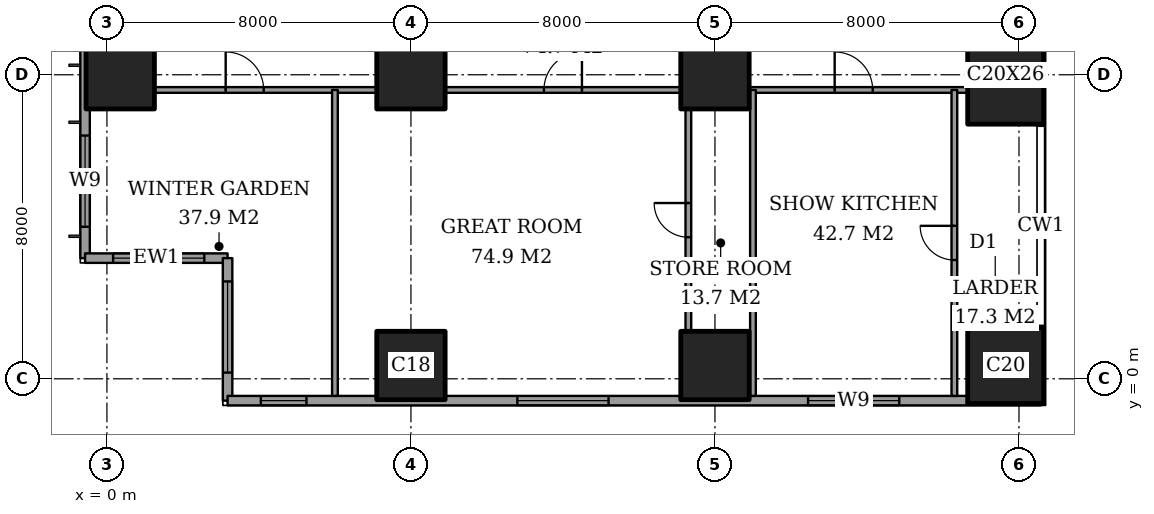
"""IFC4 building model, lengths in metres.
Left out: names, types, materials, properties, quantities, classifications, styles, units other than length and angle.
Written with IfcOpenShell. Run it as: python <this file> out.ifc"""

import sys

from ifc_helpers import new_model, si_unit, direction, frame, frame_2d, origin, origin_2d, place, context, subcontext, project, spatial, rectangle, extrude, element, fill, save


model = new_model("IFC4")
c1 = context("Model", 3, precision=1e-05, world=origin(), true_north=direction((0.0, 1.0)))
c2 = subcontext(c1, "Body", "Model", "MODEL_VIEW")
j1 = project(units=[si_unit("LENGTHUNIT", "METRE"), si_unit("PLANEANGLEUNIT", "RADIAN")], contexts=[c1])
p1 = place(None, origin())
s1 = spatial("IfcSite", under=j1, at=p1, CompositionType="ELEMENT")
p2 = place(p1, origin())
s2 = spatial("IfcBuilding", under=s1, at=p2, CompositionType="ELEMENT")
p3 = place(p2, frame((0.0, 0.0, 211.0)))
s3 = spatial("IfcBuildingStorey", under=s2, at=p3, CompositionType="ELEMENT", Elevation=211.0)
for number, where, z_axis, x_axis in (
    (1, (0.35, 8.0, 0.0), (0.0, 0.0, 1.0), (1.0, 0.0, 0.0)),
    (2, (8.0, 0.35, 0.0), (0.0, 0.0, 1.0), (1.0, 0.0, 0.0)),
    (3, (8.0, 8.0, 0.0), (0.0, 0.0, 1.0), (1.0, 0.0, 0.0)),
    (4, (16.0, 0.35, 0.0), (0.0, 0.0, 1.0), (1.0, 0.0, 0.0)),
    (5, (16.0, 8.0, 0.0), (0.0, 0.0, 1.0), (1.0, 0.0, 0.0)),
):
    element("IfcColumn", number, at=place(p3, frame(where, z_axis=z_axis, x_axis=x_axis)), inside=s3, PredefinedType="COLUMN", context=c2, shape_type="SweptSolid", body=[
        extrude(rectangle(XDim=1.8, YDim=1.8, at=origin_2d()), origin(), (0.0, 0.0, 1.0), 3.6),
    ])
p4 = place(p3, frame((23.65, 0.35, 0.0), z_axis=(0.0, 0.0, 1.0), x_axis=(1.0, 0.0, 0.0)))
e6 = element("IfcColumn", 6, at=p4, inside=s3, PredefinedType="COLUMN", context=c2, shape_type="SweptSolid", body=[
    extrude(rectangle(XDim=2.0, YDim=2.0, at=origin_2d()), origin(), (0.0, 0.0, 1.0), 3.6),
])
p5 = place(p3, frame((23.65, 8.0, 0.0), z_axis=(0.0, 0.0, 1.0), x_axis=(1.0, 0.0, 0.0)))
e7 = element("IfcColumn", 7, at=p5, inside=s3, PredefinedType="COLUMN", context=c2, shape_type="SweptSolid", body=[
    extrude(rectangle(XDim=2.0, YDim=2.6, at=origin_2d()), origin(), (0.0, 0.0, 1.0), 3.6),
])
p6 = place(p3, frame((-0.575, 44.825, 0.0), z_axis=(0.0, 0.0, 1.0), x_axis=(0.0, -1.0, 0.0)))
e8 = element("IfcWall", 8, at=p6, inside=s3, PredefinedType="SOLIDWALL", context=c2, shape_type="SweptSolid", body=[
    extrude(rectangle(XDim=41.65, YDim=0.25, at=frame_2d((20.825, 0.0))), origin(), (0.0, 0.0, 1.0), 3.6),
])
p7 = place(p6, frame((0.825, 0.0, 0.2)))
e9 = element("IfcOpeningElement", 9, at=p7, cuts=e8, PredefinedType="OPENING", context=c2, shape_type="SweptSolid", body=[
    extrude(rectangle(XDim=2.4, YDim=2.4, at=frame_2d((1.2, 1.2))), frame((0.0, 0.135, 0.0), z_axis=(0.0, -1.0, 0.0), x_axis=(1.0, 0.0, 0.0)), (0.0, 0.0, 1.0), 0.27),
])
p8 = place(p6, frame((6.05, 0.0, 0.2)))
e10 = element("IfcOpeningElement", 10, at=p8, cuts=e8, PredefinedType="OPENING", context=c2, shape_type="SweptSolid", body=[
    extrude(rectangle(XDim=1.2, YDim=2.4, at=frame_2d((0.6, 1.2))), frame((0.0, 0.135, 0.0), z_axis=(0.0, -1.0, 0.0), x_axis=(1.0, 0.0, 0.0)), (0.0, 0.0, 1.0), 0.27),
])
p9 = place(p6, frame((8.225, 0.0, 0.2)))
e11 = element("IfcOpeningElement", 11, at=p9, cuts=e8, PredefinedType="OPENING", context=c2, shape_type="SweptSolid", body=[
    extrude(rectangle(XDim=2.4, YDim=2.4, at=frame_2d((1.2, 1.2))), frame((0.0, 0.135, 0.0), z_axis=(0.0, -1.0, 0.0), x_axis=(1.0, 0.0, 0.0)), (0.0, 0.0, 1.0), 0.27),
])
p10 = place(p6, frame((15.625, 0.0, 0.2)))
e12 = element("IfcOpeningElement", 12, at=p10, cuts=e8, PredefinedType="OPENING", context=c2, shape_type="SweptSolid", body=[
    extrude(rectangle(XDim=2.4, YDim=2.4, at=frame_2d((1.2, 1.2))), frame((0.0, 0.135, 0.0), z_axis=(0.0, -1.0, 0.0), x_axis=(1.0, 0.0, 0.0)), (0.0, 0.0, 1.0), 0.27),
])
p11 = place(p6, frame((23.625, 0.0, 0.2)))
e13 = element("IfcOpeningElement", 13, at=p11, cuts=e8, PredefinedType="OPENING", context=c2, shape_type="SweptSolid", body=[
    extrude(rectangle(XDim=2.4, YDim=2.4, at=frame_2d((1.2, 1.2))), frame((0.0, 0.135, 0.0), z_axis=(0.0, -1.0, 0.0), x_axis=(1.0, 0.0, 0.0)), (0.0, 0.0, 1.0), 0.27),
])
p12 = place(p6, frame((30.775, 0.0, 0.2)))
e14 = element("IfcOpeningElement", 14, at=p12, cuts=e8, PredefinedType="OPENING", context=c2, shape_type="SweptSolid", body=[
    extrude(rectangle(XDim=2.4, YDim=2.4, at=frame_2d((1.2, 1.2))), frame((0.0, 0.135, 0.0), z_axis=(0.0, -1.0, 0.0), x_axis=(1.0, 0.0, 0.0)), (0.0, 0.0, 1.0), 0.27),
])
p13 = place(p6, frame((34.55, 0.0, 0.2)))
e15 = element("IfcOpeningElement", 15, at=p13, cuts=e8, PredefinedType="OPENING", context=c2, shape_type="SweptSolid", body=[
    extrude(rectangle(XDim=1.2, YDim=2.4, at=frame_2d((0.6, 1.2))), frame((0.0, 0.135, 0.0), z_axis=(0.0, -1.0, 0.0), x_axis=(1.0, 0.0, 0.0)), (0.0, 0.0, 1.0), 0.27),
])
p14 = place(p6, frame((38.425, 0.0, 0.2)))
e16 = element("IfcOpeningElement", 16, at=p14, cuts=e8, PredefinedType="OPENING", context=c2, shape_type="SweptSolid", body=[
    extrude(rectangle(XDim=2.4, YDim=2.4, at=frame_2d((1.2, 1.2))), frame((0.0, 0.135, 0.0), z_axis=(0.0, -1.0, 0.0), x_axis=(1.0, 0.0, 0.0)), (0.0, 0.0, 1.0), 0.27),
])
p15 = place(p3, frame((-0.575, 3.175, 0.0), z_axis=(0.0, 0.0, 1.0), x_axis=(1.0, 0.0, 0.0)))
e17 = element("IfcWall", 17, at=p15, inside=s3, PredefinedType="SOLIDWALL", context=c2, shape_type="SweptSolid", body=[
    extrude(rectangle(XDim=3.75, YDim=0.25, at=frame_2d((1.875, 0.0))), origin(), (0.0, 0.0, 1.0), 3.6),
])
p16 = place(p15, frame((0.738, 0.0, 0.2)))
e18 = element("IfcOpeningElement", 18, at=p16, cuts=e17, PredefinedType="OPENING", context=c2, shape_type="SweptSolid", body=[
    extrude(rectangle(XDim=2.4, YDim=2.4, at=frame_2d((1.2, 1.2))), frame((0.0, 0.135, 0.0), z_axis=(0.0, -1.0, 0.0), x_axis=(1.0, 0.0, 0.0)), (0.0, 0.0, 1.0), 0.27),
])
p17 = place(p3, frame((3.175, 3.175, 0.0), z_axis=(0.0, 0.0, 1.0), x_axis=(0.0, -1.0, 0.0)))
e19 = element("IfcWall", 19, at=p17, inside=s3, PredefinedType="SOLIDWALL", context=c2, shape_type="SweptSolid", body=[
    extrude(rectangle(XDim=3.75, YDim=0.25, at=frame_2d((1.875, 0.0))), origin(), (0.0, 0.0, 1.0), 3.6),
])
p18 = place(p17, frame((0.613, 0.0, 0.2)))
e20 = element("IfcOpeningElement", 20, at=p18, cuts=e19, PredefinedType="OPENING", context=c2, shape_type="SweptSolid", body=[
    extrude(rectangle(XDim=2.4, YDim=2.4, at=frame_2d((1.2, 1.2))), frame((0.0, 0.135, 0.0), z_axis=(0.0, -1.0, 0.0), x_axis=(1.0, 0.0, 0.0)), (0.0, 0.0, 1.0), 0.27),
])
p19 = place(p3, frame((3.175, -0.575, 0.0), z_axis=(0.0, 0.0, 1.0), x_axis=(1.0, 0.0, 0.0)))
e21 = element("IfcWall", 21, at=p19, inside=s3, PredefinedType="SOLIDWALL", context=c2, shape_type="SweptSolid", body=[
    extrude(rectangle(XDim=21.4, YDim=0.25, at=frame_2d((10.7, 0.0))), origin(), (0.0, 0.0, 1.0), 3.6),
])
p20 = place(p19, frame((0.875, 0.0, 0.2)))
e22 = element("IfcOpeningElement", 22, at=p20, cuts=e21, PredefinedType="OPENING", context=c2, shape_type="SweptSolid", body=[
    extrude(rectangle(XDim=1.2, YDim=2.4, at=frame_2d((0.6, 1.2))), frame((0.0, 0.135, 0.0), z_axis=(0.0, -1.0, 0.0), x_axis=(1.0, 0.0, 0.0)), (0.0, 0.0, 1.0), 0.27),
])
p21 = place(p19, frame((7.625, 0.0, 0.2)))
e23 = element("IfcOpeningElement", 23, at=p21, cuts=e21, PredefinedType="OPENING", context=c2, shape_type="SweptSolid", body=[
    extrude(rectangle(XDim=2.4, YDim=2.4, at=frame_2d((1.2, 1.2))), frame((0.0, 0.135, 0.0), z_axis=(0.0, -1.0, 0.0), x_axis=(1.0, 0.0, 0.0)), (0.0, 0.0, 1.0), 0.27),
])
p22 = place(p19, frame((15.275, 0.0, 0.2)))
e24 = element("IfcOpeningElement", 24, at=p22, cuts=e21, PredefinedType="OPENING", context=c2, shape_type="SweptSolid", body=[
    extrude(rectangle(XDim=2.4, YDim=2.4, at=frame_2d((1.2, 1.2))), frame((0.0, 0.135, 0.0), z_axis=(0.0, -1.0, 0.0), x_axis=(1.0, 0.0, 0.0)), (0.0, 0.0, 1.0), 0.27),
])
p23 = place(p3, frame((1.25, 7.6, 0.0), z_axis=(0.0, 0.0, 1.0), x_axis=(1.0, 0.0, 0.0)))
e25 = element("IfcWall", 25, at=p23, inside=s3, PredefinedType="PARTITIONING", context=c2, shape_type="SweptSolid", body=[
    extrude(rectangle(XDim=5.85, YDim=0.15, at=frame_2d((2.925, 0.0))), origin(), (0.0, 0.0, 1.0), 3.35),
])
p24 = place(p23, frame((1.875, 0.0, 0.0)))
e26 = element("IfcOpeningElement", 26, at=p24, cuts=e25, PredefinedType="OPENING", context=c2, shape_type="SweptSolid", body=[
    extrude(rectangle(XDim=1.0, YDim=2.1, at=frame_2d((0.5, 1.05))), frame((0.0, 0.085, 0.0), z_axis=(0.0, -1.0, 0.0), x_axis=(1.0, 0.0, 0.0)), (0.0, 0.0, 1.0), 0.17),
])
p25 = place(p3, frame((8.9, 7.6, 0.0), z_axis=(0.0, 0.0, 1.0), x_axis=(1.0, 0.0, 0.0)))
e27 = element("IfcWall", 27, at=p25, inside=s3, PredefinedType="PARTITIONING", context=c2, shape_type="SweptSolid", body=[
    extrude(rectangle(XDim=6.2, YDim=0.15, at=frame_2d((3.1, 0.0))), origin(), (0.0, 0.0, 1.0), 3.35),
])
p26 = place(p25, frame((2.6, 0.0, 0.0)))
e28 = element("IfcOpeningElement", 28, at=p26, cuts=e27, PredefinedType="OPENING", context=c2, shape_type="SweptSolid", body=[
    extrude(rectangle(XDim=1.0, YDim=2.1, at=frame_2d((0.5, 1.05))), frame((0.0, 0.085, 0.0), z_axis=(0.0, -1.0, 0.0), x_axis=(1.0, 0.0, 0.0)), (0.0, 0.0, 1.0), 0.17),
])
p27 = place(p3, frame((16.9, 7.6, 0.0), z_axis=(0.0, 0.0, 1.0), x_axis=(1.0, 0.0, 0.0)))
e29 = element("IfcWall", 29, at=p27, inside=s3, PredefinedType="PARTITIONING", context=c2, shape_type="SweptSolid", body=[
    extrude(rectangle(XDim=5.75, YDim=0.15, at=frame_2d((2.875, 0.0))), origin(), (0.0, 0.0, 1.0), 3.35),
])
p28 = place(p27, frame((2.25, 0.0, 0.0)))
e30 = element("IfcOpeningElement", 30, at=p28, cuts=e29, PredefinedType="OPENING", context=c2, shape_type="SweptSolid", body=[
    extrude(rectangle(XDim=1.0, YDim=2.1, at=frame_2d((0.5, 1.05))), frame((0.0, 0.085, 0.0), z_axis=(0.0, -1.0, 0.0), x_axis=(1.0, 0.0, 0.0)), (0.0, 0.0, 1.0), 0.17),
])
p29 = place(p3, frame((6.0, -0.45, 0.0), z_axis=(0.0, 0.0, 1.0), x_axis=(0.0, 1.0, 0.0)))
e31 = element("IfcWall", 31, at=p29, inside=s3, PredefinedType="PARTITIONING", context=c2, shape_type="SweptSolid", body=[
    extrude(rectangle(XDim=8.05, YDim=0.15, at=frame_2d((4.025, 0.0))), origin(), (0.0, 0.0, 1.0), 3.35),
])
p30 = place(p3, frame((15.3, 1.25, 0.0), z_axis=(0.0, 0.0, 1.0), x_axis=(0.0, 1.0, 0.0)))
e32 = element("IfcWall", 32, at=p30, inside=s3, PredefinedType="PARTITIONING", context=c2, shape_type="SweptSolid", body=[
    extrude(rectangle(XDim=5.85, YDim=0.15, at=frame_2d((2.925, 0.0))), origin(), (0.0, 0.0, 1.0), 3.35),
])
p31 = place(p30, frame((2.475, 0.0, 0.0)))
e33 = element("IfcOpeningElement", 33, at=p31, cuts=e32, PredefinedType="OPENING", context=c2, shape_type="SweptSolid", body=[
    extrude(rectangle(XDim=0.9, YDim=2.1, at=frame_2d((0.45, 1.05))), frame((0.0, 0.085, 0.0), z_axis=(0.0, -1.0, 0.0), x_axis=(1.0, 0.0, 0.0)), (0.0, 0.0, 1.0), 0.17),
])
p32 = place(p3, frame((17.0, -0.45, 0.0), z_axis=(0.0, 0.0, 1.0), x_axis=(0.0, 1.0, 0.0)))
e34 = element("IfcWall", 34, at=p32, inside=s3, PredefinedType="PARTITIONING", context=c2, shape_type="SweptSolid", body=[
    extrude(rectangle(XDim=8.05, YDim=0.15, at=frame_2d((4.025, 0.0))), origin(), (0.0, 0.0, 1.0), 3.35),
])
p33 = place(p3, frame((22.3, -0.45, 0.0), z_axis=(0.0, 0.0, 1.0), x_axis=(0.0, 1.0, 0.0)))
e35 = element("IfcWall", 35, at=p33, inside=s3, PredefinedType="PARTITIONING", context=c2, shape_type="SweptSolid", body=[
    extrude(rectangle(XDim=8.05, YDim=0.15, at=frame_2d((4.025, 0.0))), origin(), (0.0, 0.0, 1.0), 3.35),
])
p34 = place(p33, frame((3.575, 0.0, 0.0)))
e36 = element("IfcOpeningElement", 36, at=p34, cuts=e35, PredefinedType="OPENING", context=c2, shape_type="SweptSolid", body=[
    extrude(rectangle(XDim=0.9, YDim=2.1, at=frame_2d((0.45, 1.05))), frame((0.0, 0.085, 0.0), z_axis=(0.0, -1.0, 0.0), x_axis=(1.0, 0.0, 0.0)), (0.0, 0.0, 1.0), 0.17),
])
p35 = place(p14, origin())
e37 = element("IfcWindow", 37, at=p35, inside=s3, PartitioningType="SINGLE_PANEL", PredefinedType="WINDOW", context=c2, shape_type="SweptSolid", body=[
    extrude(rectangle(XDim=2.4, YDim=2.4, at=frame_2d((1.2, 1.2))), frame((0.0, 0.03, 0.0), z_axis=(0.0, -1.0, 0.0), x_axis=(1.0, 0.0, 0.0)), (0.0, 0.0, 1.0), 0.06),
])
fill(e16, e37)
p36 = place(p16, origin())
e38 = element("IfcWindow", 38, at=p36, inside=s3, PartitioningType="SINGLE_PANEL", PredefinedType="WINDOW", context=c2, shape_type="SweptSolid", body=[
    extrude(rectangle(XDim=2.4, YDim=2.4, at=frame_2d((1.2, 1.2))), frame((0.0, 0.03, 0.0), z_axis=(0.0, -1.0, 0.0), x_axis=(1.0, 0.0, 0.0)), (0.0, 0.0, 1.0), 0.06),
])
fill(e18, e38)
p37 = place(p18, origin())
e39 = element("IfcWindow", 39, at=p37, inside=s3, PartitioningType="SINGLE_PANEL", PredefinedType="WINDOW", context=c2, shape_type="SweptSolid", body=[
    extrude(rectangle(XDim=2.4, YDim=2.4, at=frame_2d((1.2, 1.2))), frame((0.0, 0.03, 0.0), z_axis=(0.0, -1.0, 0.0), x_axis=(1.0, 0.0, 0.0)), (0.0, 0.0, 1.0), 0.06),
])
fill(e20, e39)
p38 = place(p20, origin())
e40 = element("IfcWindow", 40, at=p38, inside=s3, PartitioningType="SINGLE_PANEL", PredefinedType="WINDOW", context=c2, shape_type="SweptSolid", body=[
    extrude(rectangle(XDim=1.2, YDim=2.4, at=frame_2d((0.6, 1.2))), frame((0.0, 0.03, 0.0), z_axis=(0.0, -1.0, 0.0), x_axis=(1.0, 0.0, 0.0)), (0.0, 0.0, 1.0), 0.06),
])
fill(e22, e40)
p39 = place(p21, origin())
e41 = element("IfcWindow", 41, at=p39, inside=s3, PartitioningType="SINGLE_PANEL", PredefinedType="WINDOW", context=c2, shape_type="SweptSolid", body=[
    extrude(rectangle(XDim=2.4, YDim=2.4, at=frame_2d((1.2, 1.2))), frame((0.0, 0.03, 0.0), z_axis=(0.0, -1.0, 0.0), x_axis=(1.0, 0.0, 0.0)), (0.0, 0.0, 1.0), 0.06),
])
fill(e23, e41)
p40 = place(p22, origin())
e42 = element("IfcWindow", 42, at=p40, inside=s3, PartitioningType="SINGLE_PANEL", PredefinedType="WINDOW", context=c2, shape_type="SweptSolid", body=[
    extrude(rectangle(XDim=2.4, YDim=2.4, at=frame_2d((1.2, 1.2))), frame((0.0, 0.03, 0.0), z_axis=(0.0, -1.0, 0.0), x_axis=(1.0, 0.0, 0.0)), (0.0, 0.0, 1.0), 0.06),
])
fill(e24, e42)
p41 = place(p24, origin())
e43 = element("IfcDoor", 43, at=p41, inside=s3, OperationType="SINGLE_SWING_RIGHT", PredefinedType="DOOR", context=c2, shape_type="SweptSolid", body=[
    extrude(rectangle(XDim=1.0, YDim=2.1, at=frame_2d((0.5, 1.05))), frame((0.0, 0.025, 0.0), z_axis=(0.0, -1.0, 0.0), x_axis=(1.0, 0.0, 0.0)), (0.0, 0.0, 1.0), 0.05),
])
fill(e26, e43)
p42 = place(p26, origin())
e44 = element("IfcDoor", 44, at=p42, inside=s3, OperationType="SINGLE_SWING_LEFT", PredefinedType="DOOR", context=c2, shape_type="SweptSolid", body=[
    extrude(rectangle(XDim=1.0, YDim=2.1, at=frame_2d((0.5, 1.05))), frame((0.0, 0.025, 0.0), z_axis=(0.0, -1.0, 0.0), x_axis=(1.0, 0.0, 0.0)), (0.0, 0.0, 1.0), 0.05),
])
fill(e28, e44)
p43 = place(p31, origin())
e45 = element("IfcDoor", 45, at=p43, inside=s3, OperationType="SINGLE_SWING_LEFT", PredefinedType="DOOR", context=c2, shape_type="SweptSolid", body=[
    extrude(rectangle(XDim=0.9, YDim=2.1, at=frame_2d((0.45, 1.05))), frame((0.0, 0.025, 0.0), z_axis=(0.0, -1.0, 0.0), x_axis=(1.0, 0.0, 0.0)), (0.0, 0.0, 1.0), 0.05),
])
fill(e33, e45)
p44 = place(p28, origin())
e46 = element("IfcDoor", 46, at=p44, inside=s3, OperationType="SINGLE_SWING_RIGHT", PredefinedType="DOOR", context=c2, shape_type="SweptSolid", body=[
    extrude(rectangle(XDim=1.0, YDim=2.1, at=frame_2d((0.5, 1.05))), frame((0.0, 0.025, 0.0), z_axis=(0.0, -1.0, 0.0), x_axis=(1.0, 0.0, 0.0)), (0.0, 0.0, 1.0), 0.05),
])
fill(e30, e46)
p45 = place(p34, origin())
e47 = element("IfcDoor", 47, at=p45, inside=s3, OperationType="SINGLE_SWING_LEFT", PredefinedType="DOOR", context=c2, shape_type="SweptSolid", body=[
    extrude(rectangle(XDim=0.9, YDim=2.1, at=frame_2d((0.45, 1.05))), frame((0.0, 0.025, 0.0), z_axis=(0.0, -1.0, 0.0), x_axis=(1.0, 0.0, 0.0)), (0.0, 0.0, 1.0), 0.05),
])
fill(e36, e47)
save(model, sys.argv[1])
